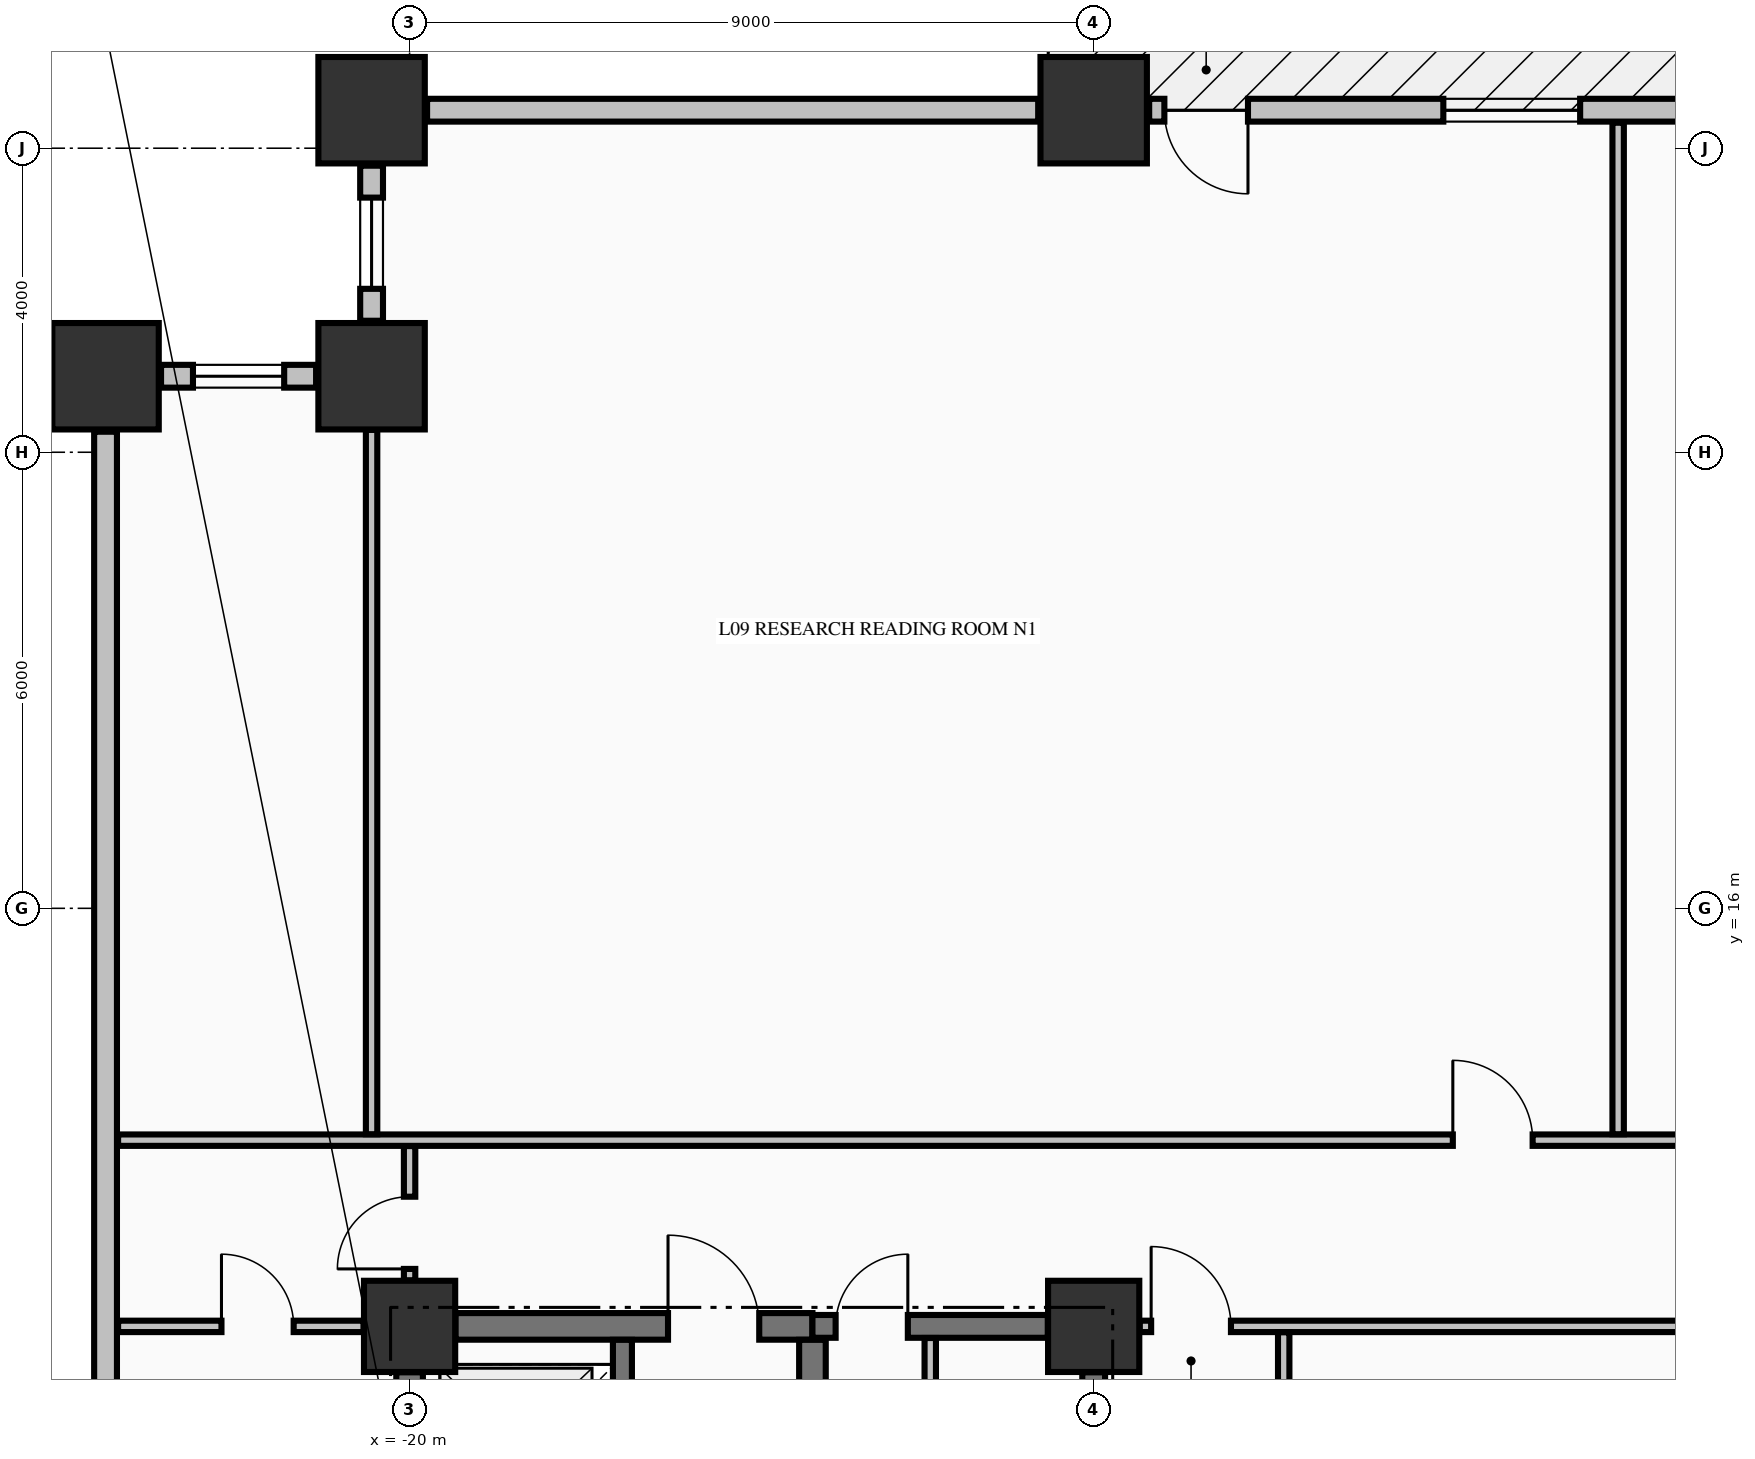
"""IFC4 building model, lengths in metres.
Left out: names, types, materials, properties, quantities, classifications, styles, units other than length and angle.
Written with IfcOpenShell. Run it as: python <this file> out.ifc"""

import sys

from ifc_helpers import new_model, si_unit, direction, frame, frame_2d, origin, origin_2d, place, context, subcontext, project, spatial, rectangle, extrude, element, fill, save


model = new_model("IFC4")
c1 = context("Model", 3, precision=1e-05, world=origin(), true_north=direction((0.0, 1.0)))
c2 = subcontext(c1, "Body", "Model", "MODEL_VIEW")
j1 = project(units=[si_unit("LENGTHUNIT", "METRE"), si_unit("PLANEANGLEUNIT", "RADIAN")], contexts=[c1])
p1 = place(None, origin())
s1 = spatial("IfcSite", under=j1, at=p1, CompositionType="ELEMENT")
p2 = place(p1, origin())
s2 = spatial("IfcBuilding", under=s1, at=p2, CompositionType="ELEMENT")
p3 = place(p2, frame((0.0, 0.0, 41.48)))
s3 = spatial("IfcBuildingStorey", under=s2, at=p3, CompositionType="ELEMENT", Elevation=41.48)
for number, where, z_axis, x_axis in (
    (1, (-20.5, 26.5, -0.25), (0.0, 0.0, 1.0), (1.0, 0.0, 0.0)),
    (2, (-11.0, 26.5, -0.25), (0.0, 0.0, 1.0), (1.0, 0.0, 0.0)),
    (3, (-24.0, 23.0, -0.25), (0.0, 0.0, 1.0), (1.0, 0.0, 0.0)),
    (4, (-20.5, 23.0, -0.25), (0.0, 0.0, 1.0), (1.0, 0.0, 0.0)),
):
    element("IfcColumn", number, at=place(p3, frame(where, z_axis=z_axis, x_axis=x_axis)), inside=s3, PredefinedType="COLUMN", context=c2, shape_type="SweptSolid", body=[
        extrude(rectangle(XDim=1.4, YDim=1.4, at=origin_2d()), origin(), (0.0, 0.0, 1.0), 3.57),
    ])
for number, where, z_axis, x_axis in (
    (5, (-20.0, 10.5, -0.25), (0.0, 0.0, 1.0), (1.0, 0.0, 0.0)),
    (6, (-11.0, 10.5, -0.25), (0.0, 0.0, 1.0), (1.0, 0.0, 0.0)),
):
    element("IfcColumn", number, at=place(p3, frame(where, z_axis=z_axis, x_axis=x_axis)), inside=s3, PredefinedType="COLUMN", context=c2, shape_type="SweptSolid", body=[
        extrude(rectangle(XDim=1.2, YDim=1.2, at=origin_2d()), origin(), (0.0, 0.0, 1.0), 3.57),
    ])
p4 = place(p3, frame((-20.5, 25.77, 0.0), z_axis=(0.0, 0.0, 1.0), x_axis=(0.0, -1.0, 0.0)))
e7 = element("IfcWall", 7, at=p4, inside=s3, PredefinedType="STANDARD", context=c2, shape_type="SweptSolid", body=[
    extrude(rectangle(XDim=2.04, YDim=0.3, at=frame_2d((1.02, 0.0))), origin(), (0.0, 0.0, 1.0), 2.712),
])
p5 = place(p4, frame((0.42, 0.0, 0.82)))
e8 = element("IfcOpeningElement", 8, at=p5, cuts=e7, PredefinedType="OPENING", context=c2, shape_type="SweptSolid", body=[
    extrude(rectangle(XDim=1.2, YDim=1.65, at=frame_2d((0.6, 0.825))), frame((0.0, 0.16, 0.0), z_axis=(0.0, -1.0, 0.0), x_axis=(1.0, 0.0, 0.0)), (0.0, 0.0, 1.0), 0.32),
])
p6 = place(p3, frame((-21.23, 23.0, 0.0), z_axis=(0.0, 0.0, 1.0), x_axis=(-1.0, 0.0, 0.0)))
e9 = element("IfcWall", 9, at=p6, inside=s3, PredefinedType="STANDARD", context=c2, shape_type="SweptSolid", body=[
    extrude(rectangle(XDim=2.04, YDim=0.3, at=frame_2d((1.02, 0.0))), origin(), (0.0, 0.0, 1.0), 2.712),
])
p7 = place(p6, frame((0.42, 0.0, 0.82)))
e10 = element("IfcOpeningElement", 10, at=p7, cuts=e9, PredefinedType="OPENING", context=c2, shape_type="SweptSolid", body=[
    extrude(rectangle(XDim=1.2, YDim=1.65, at=frame_2d((0.6, 0.825))), frame((0.0, 0.16, 0.0), z_axis=(0.0, -1.0, 0.0), x_axis=(1.0, 0.0, 0.0)), (0.0, 0.0, 1.0), 0.32),
])
p8 = place(p3, frame((-11.73, 26.5, 0.0), z_axis=(0.0, 0.0, 1.0), x_axis=(-1.0, 0.0, 0.0)))
e11 = element("IfcWall", 11, at=p8, inside=s3, PredefinedType="STANDARD", context=c2, shape_type="SweptSolid", body=[
    extrude(rectangle(XDim=8.04, YDim=0.3, at=frame_2d((4.02, 0.0))), origin(), (0.0, 0.0, 1.0), 2.712),
])
p9 = place(p3, frame((-0.73, 26.5, 0.0), z_axis=(0.0, 0.0, 1.0), x_axis=(-1.0, 0.0, 0.0)))
e12 = element("IfcWall", 12, at=p9, inside=s3, PredefinedType="STANDARD", context=c2, shape_type="SweptSolid", body=[
    extrude(rectangle(XDim=9.54, YDim=0.3, at=frame_2d((4.77, 0.0))), origin(), (0.0, 0.0, 1.0), 2.712),
])
p10 = place(p9, frame((8.24, 0.0, 0.0)))
e13 = element("IfcOpeningElement", 13, at=p10, cuts=e12, PredefinedType="OPENING", context=c2, shape_type="SweptSolid", body=[
    extrude(rectangle(XDim=1.1, YDim=2.15, at=frame_2d((0.55, 1.075))), frame((0.0, 0.16, 0.0), z_axis=(0.0, -1.0, 0.0), x_axis=(1.0, 0.0, 0.0)), (0.0, 0.0, 1.0), 0.32),
])
p11 = place(p9, frame((3.87, 0.0, 0.78)))
e14 = element("IfcOpeningElement", 14, at=p11, cuts=e12, PredefinedType="OPENING", context=c2, shape_type="SweptSolid", body=[
    extrude(rectangle(XDim=1.8, YDim=1.72, at=frame_2d((0.9, 0.86))), frame((0.0, 0.16, 0.0), z_axis=(0.0, -1.0, 0.0), x_axis=(1.0, 0.0, 0.0)), (0.0, 0.0, 1.0), 0.32),
])
p12 = place(p3, frame((-24.0, 22.27, 0.0), z_axis=(0.0, 0.0, 1.0), x_axis=(0.0, -1.0, 0.0)))
e15 = element("IfcWall", 15, at=p12, inside=s3, PredefinedType="STANDARD", context=c2, shape_type="SweptSolid", body=[
    extrude(rectangle(XDim=12.54, YDim=0.3, at=frame_2d((6.27, 0.0))), origin(), (0.0, 0.0, 1.0), 2.712),
])
p13 = place(p3, frame((-19.396, 10.5, 0.0), z_axis=(0.0, 0.0, 1.0), x_axis=(1.0, 0.0, 0.0)))
e16 = element("IfcWall", 16, at=p13, inside=s3, PredefinedType="SHEAR", context=c2, shape_type="SweptSolid", body=[
    extrude(rectangle(XDim=4.696, YDim=0.35, at=frame_2d((2.348, 0.0))), origin(), (0.0, 0.0, 1.0), 3.32),
])
p14 = place(p13, frame((2.796, 0.0, 0.0)))
e17 = element("IfcOpeningElement", 17, at=p14, cuts=e16, PredefinedType="OPENING", context=c2, shape_type="SweptSolid", body=[
    extrude(rectangle(XDim=1.2, YDim=2.15, at=frame_2d((0.6, 1.075))), frame((0.0, 0.185, 0.0), z_axis=(0.0, -1.0, 0.0), x_axis=(1.0, 0.0, 0.0)), (0.0, 0.0, 1.0), 0.37),
])
p15 = place(p3, frame((-14.7, 10.5, 0.0), z_axis=(0.0, 0.0, 1.0), x_axis=(1.0, 0.0, 0.0)))
e18 = element("IfcWall", 18, at=p15, inside=s3, PredefinedType="SHEAR", context=c2, shape_type="SweptSolid", body=[
    extrude(rectangle(XDim=3.096, YDim=0.3, at=frame_2d((1.548, 0.0))), origin(), (0.0, 0.0, 1.0), 3.32),
])
p16 = place(p15, frame((0.305, 0.0, 0.0)))
e19 = element("IfcOpeningElement", 19, at=p16, cuts=e18, PredefinedType="OPENING", context=c2, shape_type="SweptSolid", body=[
    extrude(rectangle(XDim=0.95, YDim=2.15, at=frame_2d((0.475, 1.075))), frame((0.0, 0.16, 0.0), z_axis=(0.0, -1.0, 0.0), x_axis=(1.0, 0.0, 0.0)), (0.0, 0.0, 1.0), 0.32),
])
p17 = place(p3, frame((-23.835, 10.5, 0.0), z_axis=(0.0, 0.0, 1.0), x_axis=(1.0, 0.0, 0.0)))
e20 = element("IfcWall", 20, at=p17, inside=s3, PredefinedType="PARTITIONING", context=c2, shape_type="SweptSolid", body=[
    extrude(rectangle(XDim=3.229, YDim=0.15, at=frame_2d((1.615, 0.0))), origin(), (0.0, 0.0, 1.0), 3.32),
])
p18 = place(p17, frame((1.36, 0.0, 0.0)))
e21 = element("IfcOpeningElement", 21, at=p18, cuts=e20, PredefinedType="OPENING", context=c2, shape_type="SweptSolid", body=[
    extrude(rectangle(XDim=0.95, YDim=2.15, at=frame_2d((0.475, 1.075))), frame((0.0, 0.085, 0.0), z_axis=(0.0, -1.0, 0.0), x_axis=(1.0, 0.0, 0.0)), (0.0, 0.0, 1.0), 0.17),
])
p19 = place(p3, frame((-10.394, 10.5, 0.0), z_axis=(0.0, 0.0, 1.0), x_axis=(1.0, 0.0, 0.0)))
e22 = element("IfcWall", 22, at=p19, inside=s3, PredefinedType="PARTITIONING", context=c2, shape_type="SweptSolid", body=[
    extrude(rectangle(XDim=20.788, YDim=0.15, at=frame_2d((10.394, 0.0))), origin(), (0.0, 0.0, 1.0), 3.32),
])
p20 = place(p19, frame((0.15, 0.0, 0.0)))
e23 = element("IfcOpeningElement", 23, at=p20, cuts=e22, PredefinedType="OPENING", context=c2, shape_type="SweptSolid", body=[
    extrude(rectangle(XDim=1.05, YDim=2.15, at=frame_2d((0.525, 1.075))), frame((0.0, 0.085, 0.0), z_axis=(0.0, -1.0, 0.0), x_axis=(1.0, 0.0, 0.0)), (0.0, 0.0, 1.0), 0.17),
])
p21 = place(p19, frame((19.588, 0.0, 0.0)))
e24 = element("IfcOpeningElement", 24, at=p21, cuts=e22, PredefinedType="OPENING", context=c2, shape_type="SweptSolid", body=[
    extrude(rectangle(XDim=1.05, YDim=2.15, at=frame_2d((0.525, 1.075))), frame((0.0, 0.085, 0.0), z_axis=(0.0, -1.0, 0.0), x_axis=(1.0, 0.0, 0.0)), (0.0, 0.0, 1.0), 0.17),
])
p22 = place(p3, frame((-23.835, 12.95, 0.0), z_axis=(0.0, 0.0, 1.0), x_axis=(1.0, 0.0, 0.0)))
e25 = element("IfcWall", 25, at=p22, inside=s3, PredefinedType="PARTITIONING", context=c2, shape_type="SweptSolid", body=[
    extrude(rectangle(XDim=52.67, YDim=0.15, at=frame_2d((26.335, 0.0))), origin(), (0.0, 0.0, 1.0), 3.32),
])
p23 = place(p22, frame((17.56, 0.0, 0.0)))
e26 = element("IfcOpeningElement", 26, at=p23, cuts=e25, PredefinedType="OPENING", context=c2, shape_type="SweptSolid", body=[
    extrude(rectangle(XDim=1.05, YDim=2.15, at=frame_2d((0.525, 1.075))), frame((0.0, 0.085, 0.0), z_axis=(0.0, -1.0, 0.0), x_axis=(1.0, 0.0, 0.0)), (0.0, 0.0, 1.0), 0.17),
])
p24 = place(p22, frame((31.16, 0.0, 0.0)))
e27 = element("IfcOpeningElement", 27, at=p24, cuts=e25, PredefinedType="OPENING", context=c2, shape_type="SweptSolid", body=[
    extrude(rectangle(XDim=1.05, YDim=2.15, at=frame_2d((0.525, 1.075))), frame((0.0, 0.085, 0.0), z_axis=(0.0, -1.0, 0.0), x_axis=(1.0, 0.0, 0.0)), (0.0, 0.0, 1.0), 0.17),
])
p25 = place(p3, frame((-20.0, 7.727, 0.0), z_axis=(0.0, 0.0, 1.0), x_axis=(0.0, 1.0, 0.0)))
e28 = element("IfcWall", 28, at=p25, inside=s3, PredefinedType="SHEAR", context=c2, shape_type="SweptSolid", body=[
    extrude(rectangle(XDim=2.169, YDim=0.35, at=frame_2d((1.084, 0.0))), origin(), (0.0, 0.0, 1.0), 3.32),
])
p26 = place(p3, frame((-17.2, 7.727, 0.0), z_axis=(0.0, 0.0, 1.0), x_axis=(0.0, 1.0, 0.0)))
e29 = element("IfcWall", 29, at=p26, inside=s3, PredefinedType="SOLIDWALL", context=c2, shape_type="SweptSolid", body=[
    extrude(rectangle(XDim=2.596, YDim=0.25, at=frame_2d((1.298, 0.0))), origin(), (0.0, 0.0, 1.0), 3.32),
])
p27 = place(p26, frame((0.773, 0.0, 0.0)))
e30 = element("IfcOpeningElement", 30, at=p27, cuts=e29, PredefinedType="OPENING", context=c2, shape_type="SweptSolid", body=[
    extrude(rectangle(XDim=1.1, YDim=2.2, at=frame_2d((0.55, 1.1))), frame((0.0, 0.135, 0.0), z_axis=(0.0, -1.0, 0.0), x_axis=(1.0, 0.0, 0.0)), (0.0, 0.0, 1.0), 0.27),
])
p28 = place(p3, frame((-14.7, 5.852, 0.0), z_axis=(0.0, 0.0, 1.0), x_axis=(0.0, 1.0, 0.0)))
e31 = element("IfcWall", 31, at=p28, inside=s3, PredefinedType="SHEAR", context=c2, shape_type="SweptSolid", body=[
    extrude(rectangle(XDim=4.471, YDim=0.35, at=frame_2d((2.235, 0.0))), origin(), (0.0, 0.0, 1.0), 3.32),
])
p29 = place(p3, frame((-11.0, 5.852, 0.0), z_axis=(0.0, 0.0, 1.0), x_axis=(0.0, 1.0, 0.0)))
e32 = element("IfcWall", 32, at=p29, inside=s3, PredefinedType="SHEAR", context=c2, shape_type="SweptSolid", body=[
    extrude(rectangle(XDim=4.044, YDim=0.3, at=frame_2d((2.022, 0.0))), origin(), (0.0, 0.0, 1.0), 3.32),
])
p30 = place(p3, frame((-20.5, 13.028, 0.0), z_axis=(0.0, 0.0, 1.0), x_axis=(0.0, 1.0, 0.0)))
e33 = element("IfcWall", 33, at=p30, inside=s3, PredefinedType="PARTITIONING", context=c2, shape_type="SweptSolid", body=[
    extrude(rectangle(XDim=9.266, YDim=0.15, at=frame_2d((4.633, 0.0))), origin(), (0.0, 0.0, 1.0), 3.32),
])
p31 = place(p3, frame((-20.0, 11.106, 0.0), z_axis=(0.0, 0.0, 1.0), x_axis=(0.0, 1.0, 0.0)))
e34 = element("IfcWall", 34, at=p31, inside=s3, PredefinedType="PARTITIONING", context=c2, shape_type="SweptSolid", body=[
    extrude(rectangle(XDim=1.766, YDim=0.15, at=frame_2d((0.883, 0.0))), origin(), (0.0, 0.0, 1.0), 3.32),
])
p32 = place(p31, frame((0.15, 0.0, 0.0)))
e35 = element("IfcOpeningElement", 35, at=p32, cuts=e34, PredefinedType="OPENING", context=c2, shape_type="SweptSolid", body=[
    extrude(rectangle(XDim=0.95, YDim=2.15, at=frame_2d((0.475, 1.075))), frame((0.0, 0.085, 0.0), z_axis=(0.0, -1.0, 0.0), x_axis=(1.0, 0.0, 0.0)), (0.0, 0.0, 1.0), 0.17),
])
p33 = place(p3, frame((-13.15, 7.228, 0.0), z_axis=(0.0, 0.0, 1.0), x_axis=(0.0, 1.0, 0.0)))
e36 = element("IfcWall", 36, at=p33, inside=s3, PredefinedType="PARTITIONING", context=c2, shape_type="SweptSolid", body=[
    extrude(rectangle(XDim=3.119, YDim=0.15, at=frame_2d((1.56, 0.0))), origin(), (0.0, 0.0, 1.0), 3.32),
])
p34 = place(p33, frame((1.097, 0.0, 0.0)))
e37 = element("IfcOpeningElement", 37, at=p34, cuts=e36, PredefinedType="OPENING", context=c2, shape_type="SweptSolid", body=[
    extrude(rectangle(XDim=0.95, YDim=2.15, at=frame_2d((0.475, 1.075))), frame((0.0, 0.085, 0.0), z_axis=(0.0, -1.0, 0.0), x_axis=(1.0, 0.0, 0.0)), (0.0, 0.0, 1.0), 0.17),
])
p35 = place(p3, frame((-8.5, 3.703, 0.0), z_axis=(0.0, 0.0, 1.0), x_axis=(0.0, 1.0, 0.0)))
e38 = element("IfcWall", 38, at=p35, inside=s3, PredefinedType="PARTITIONING", context=c2, shape_type="SweptSolid", body=[
    extrude(rectangle(XDim=6.719, YDim=0.15, at=frame_2d((3.36, 0.0))), origin(), (0.0, 0.0, 1.0), 3.32),
])
p36 = place(p35, frame((2.822, 0.0, 0.0)))
e39 = element("IfcOpeningElement", 39, at=p36, cuts=e38, PredefinedType="OPENING", context=c2, shape_type="SweptSolid", body=[
    extrude(rectangle(XDim=1.05, YDim=2.15, at=frame_2d((0.525, 1.075))), frame((0.0, 0.085, 0.0), z_axis=(0.0, -1.0, 0.0), x_axis=(1.0, 0.0, 0.0)), (0.0, 0.0, 1.0), 0.17),
])
p37 = place(p3, frame((-4.1, 13.028, 0.0), z_axis=(0.0, 0.0, 1.0), x_axis=(0.0, 1.0, 0.0)))
e40 = element("IfcWall", 40, at=p37, inside=s3, PredefinedType="PARTITIONING", context=c2, shape_type="SweptSolid", body=[
    extrude(rectangle(XDim=13.307, YDim=0.15, at=frame_2d((6.653, 0.0))), origin(), (0.0, 0.0, 1.0), 3.32),
])
p38 = place(p5, origin())
e41 = element("IfcWindow", 41, at=p38, inside=s3, PartitioningType="SINGLE_PANEL", PredefinedType="WINDOW", context=c2, shape_type="SweptSolid", body=[
    extrude(rectangle(XDim=1.2, YDim=1.65, at=frame_2d((0.6, 0.825))), frame((0.0, 0.03, 0.0), z_axis=(0.0, -1.0, 0.0), x_axis=(1.0, 0.0, 0.0)), (0.0, 0.0, 1.0), 0.06),
])
fill(e8, e41)
p39 = place(p7, origin())
e42 = element("IfcWindow", 42, at=p39, inside=s3, PartitioningType="SINGLE_PANEL", PredefinedType="WINDOW", context=c2, shape_type="SweptSolid", body=[
    extrude(rectangle(XDim=1.2, YDim=1.65, at=frame_2d((0.6, 0.825))), frame((0.0, 0.03, 0.0), z_axis=(0.0, -1.0, 0.0), x_axis=(1.0, 0.0, 0.0)), (0.0, 0.0, 1.0), 0.06),
])
fill(e10, e42)
p40 = place(p10, origin())
e43 = element("IfcDoor", 43, at=p40, inside=s3, OperationType="SINGLE_SWING_LEFT", PredefinedType="DOOR", context=c2, shape_type="SweptSolid", body=[
    extrude(rectangle(XDim=1.1, YDim=2.15, at=frame_2d((0.55, 1.075))), frame((0.0, 0.025, 0.0), z_axis=(0.0, -1.0, 0.0), x_axis=(1.0, 0.0, 0.0)), (0.0, 0.0, 1.0), 0.05),
])
fill(e13, e43)
p41 = place(p11, origin())
e44 = element("IfcWindow", 44, at=p41, inside=s3, PartitioningType="SINGLE_PANEL", PredefinedType="WINDOW", context=c2, shape_type="SweptSolid", body=[
    extrude(rectangle(XDim=1.8, YDim=1.72, at=frame_2d((0.9, 0.86))), frame((0.0, 0.03, 0.0), z_axis=(0.0, -1.0, 0.0), x_axis=(1.0, 0.0, 0.0)), (0.0, 0.0, 1.0), 0.06),
])
fill(e14, e44)
p42 = place(p16, origin())
e45 = element("IfcDoor", 45, at=p42, inside=s3, OperationType="SINGLE_SWING_RIGHT", PredefinedType="DOOR", context=c2, shape_type="SweptSolid", body=[
    extrude(rectangle(XDim=0.95, YDim=2.15, at=frame_2d((0.475, 1.075))), frame((0.0, 0.025, 0.0), z_axis=(0.0, -1.0, 0.0), x_axis=(1.0, 0.0, 0.0)), (0.0, 0.0, 1.0), 0.05),
])
fill(e19, e45)
p43 = place(p14, origin())
e46 = element("IfcDoor", 46, at=p43, inside=s3, OperationType="SINGLE_SWING_LEFT", PredefinedType="DOOR", context=c2, shape_type="SweptSolid", body=[
    extrude(rectangle(XDim=1.2, YDim=2.15, at=frame_2d((0.6, 1.075))), frame((0.0, 0.025, 0.0), z_axis=(0.0, -1.0, 0.0), x_axis=(1.0, 0.0, 0.0)), (0.0, 0.0, 1.0), 0.05),
])
fill(e17, e46)
p44 = place(p20, origin())
e47 = element("IfcDoor", 47, at=p44, inside=s3, OperationType="SINGLE_SWING_LEFT", PredefinedType="DOOR", context=c2, shape_type="SweptSolid", body=[
    extrude(rectangle(XDim=1.05, YDim=2.15, at=frame_2d((0.525, 1.075))), frame((0.0, 0.025, 0.0), z_axis=(0.0, -1.0, 0.0), x_axis=(1.0, 0.0, 0.0)), (0.0, 0.0, 1.0), 0.05),
])
fill(e23, e47)
p45 = place(p23, origin())
e48 = element("IfcDoor", 48, at=p45, inside=s3, OperationType="SINGLE_SWING_LEFT", PredefinedType="DOOR", context=c2, shape_type="SweptSolid", body=[
    extrude(rectangle(XDim=1.05, YDim=2.15, at=frame_2d((0.525, 1.075))), frame((0.0, 0.025, 0.0), z_axis=(0.0, -1.0, 0.0), x_axis=(1.0, 0.0, 0.0)), (0.0, 0.0, 1.0), 0.05),
])
fill(e26, e48)
p46 = place(p32, origin())
e49 = element("IfcDoor", 49, at=p46, inside=s3, OperationType="SINGLE_SWING_LEFT", PredefinedType="DOOR", context=c2, shape_type="SweptSolid", body=[
    extrude(rectangle(XDim=0.95, YDim=2.15, at=frame_2d((0.475, 1.075))), frame((0.0, 0.025, 0.0), z_axis=(0.0, -1.0, 0.0), x_axis=(1.0, 0.0, 0.0)), (0.0, 0.0, 1.0), 0.05),
])
fill(e35, e49)
p47 = place(p18, origin())
e50 = element("IfcDoor", 50, at=p47, inside=s3, OperationType="SINGLE_SWING_LEFT", PredefinedType="DOOR", context=c2, shape_type="SweptSolid", body=[
    extrude(rectangle(XDim=0.95, YDim=2.15, at=frame_2d((0.475, 1.075))), frame((0.0, 0.025, 0.0), z_axis=(0.0, -1.0, 0.0), x_axis=(1.0, 0.0, 0.0)), (0.0, 0.0, 1.0), 0.05),
])
fill(e21, e50)
save(model, sys.argv[1])
